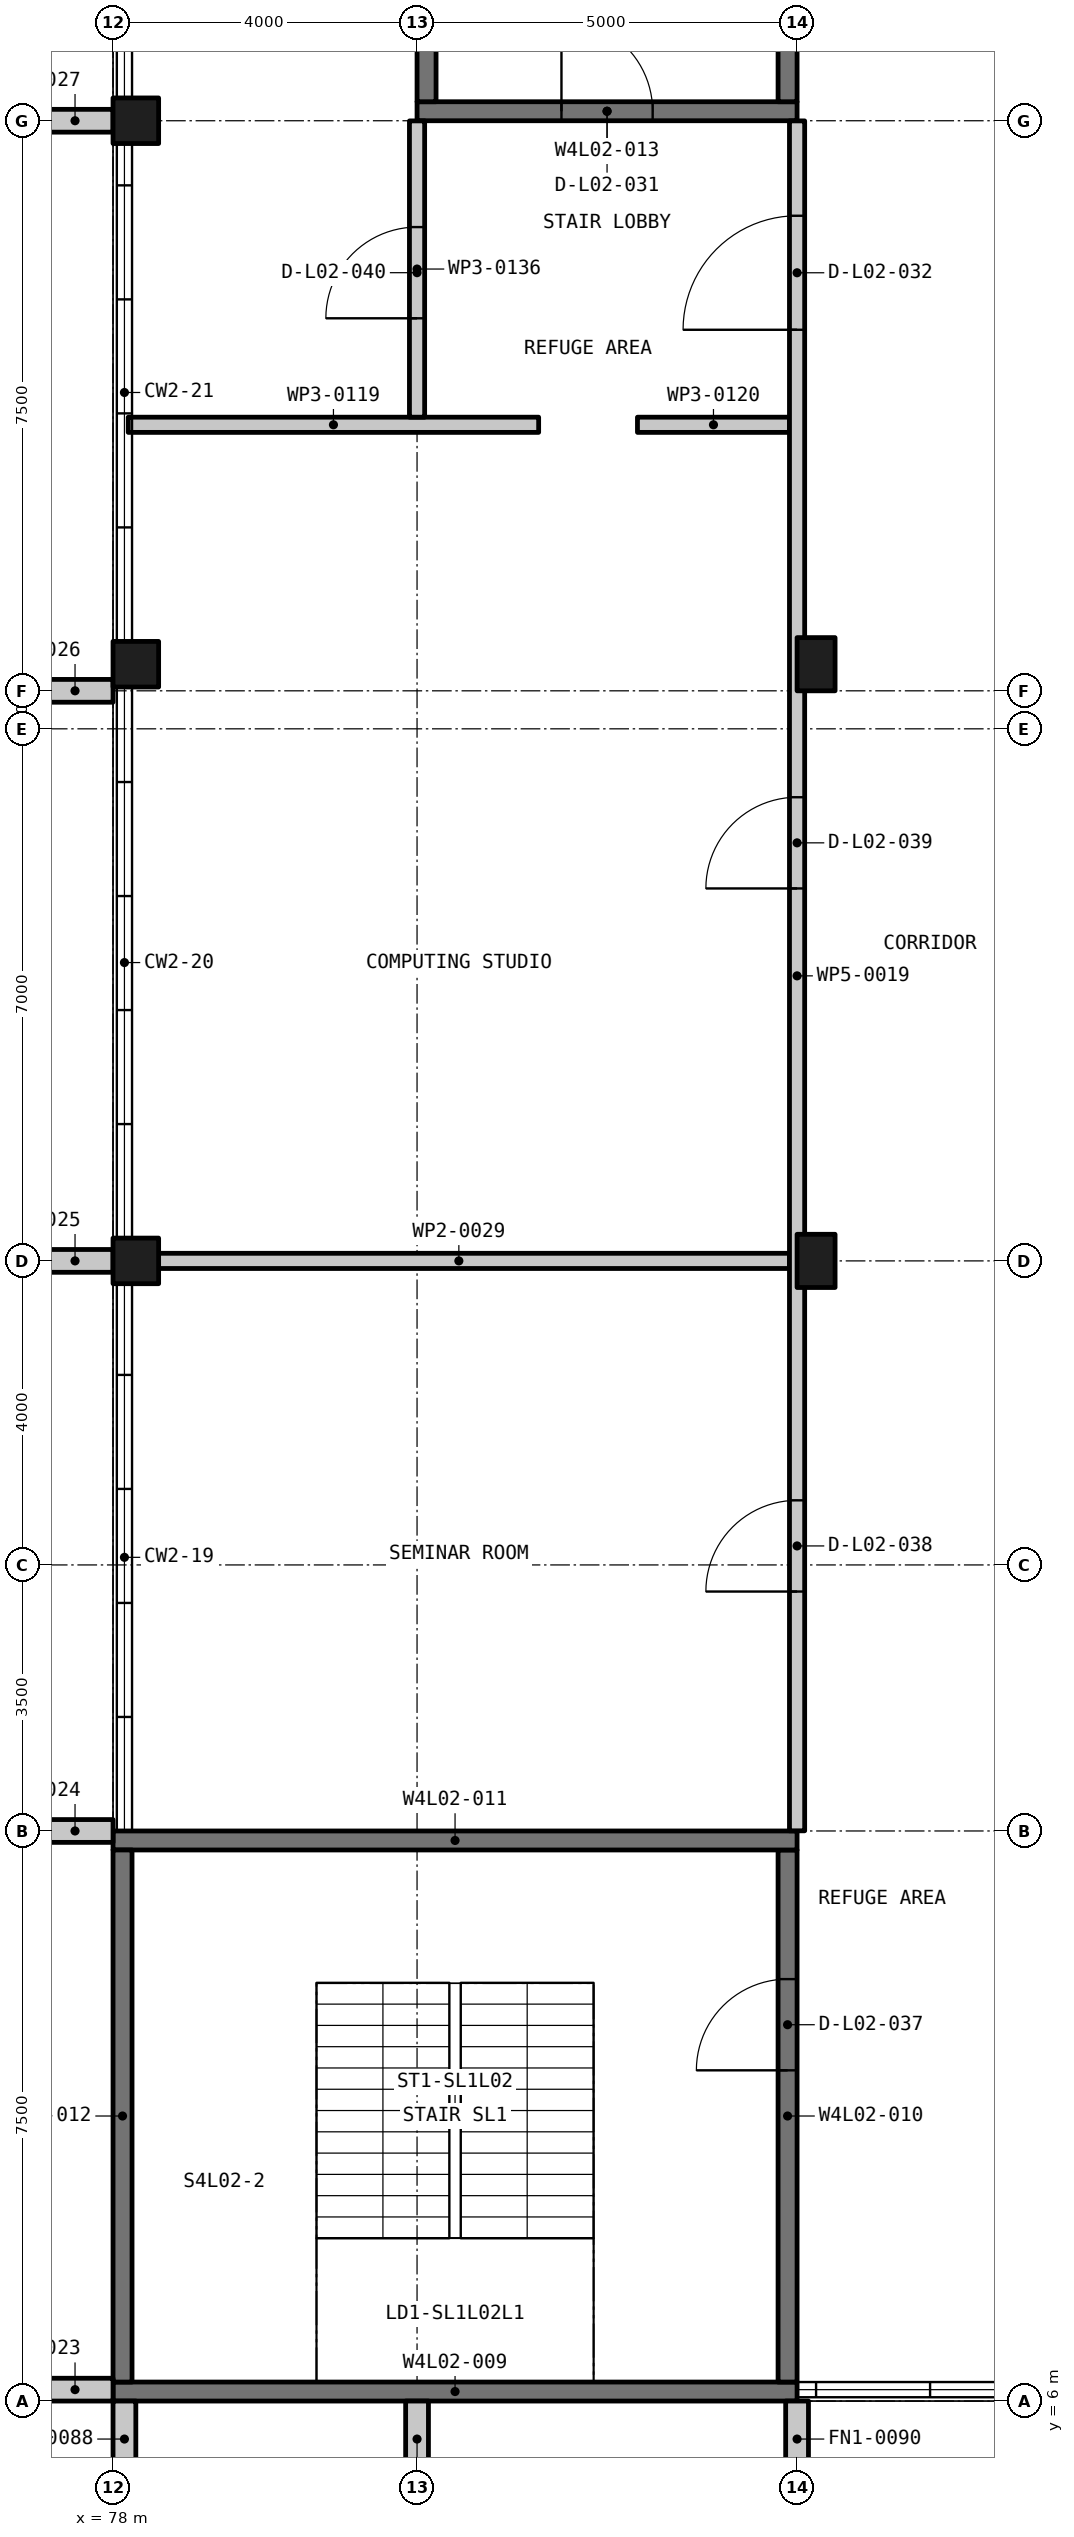
"""IFC4 building model, lengths in metres.
Left out: names, types, materials, properties, quantities, classifications, styles, units other than length and angle.
Written with IfcOpenShell. Run it as: python <this file> out.ifc"""

import sys

from ifc_helpers import new_model, si_unit, direction, frame, frame_2d, origin, origin_2d, place, context, subcontext, project, spatial, rectangle, extrude, element, fill, save


model = new_model("IFC4")
c1 = context("Model", 3, precision=1e-05, world=origin(), true_north=direction((0.0, 1.0)))
c2 = subcontext(c1, "Body", "Model", "MODEL_VIEW")
j1 = project(units=[si_unit("LENGTHUNIT", "METRE"), si_unit("PLANEANGLEUNIT", "RADIAN")], contexts=[c1])
p1 = place(None, origin())
s1 = spatial("IfcSite", under=j1, at=p1, CompositionType="ELEMENT")
p2 = place(p1, origin())
s2 = spatial("IfcBuilding", under=s1, at=p2, CompositionType="ELEMENT")
p3 = place(p2, frame((0.0, 0.0, 11.25)))
s3 = spatial("IfcBuildingStorey", under=s2, at=p3, CompositionType="ELEMENT", Elevation=11.25)
for number, where, z_axis, x_axis in (
    (1, (78.3, 21.0, -0.3), (0.0, 0.0, 1.0), (1.0, 0.0, 0.0)),
    (2, (78.3, 28.85, -0.3), (0.0, 0.0, 1.0), (1.0, 0.0, 0.0)),
    (3, (78.3, 36.0, -0.3), (0.0, 0.0, 1.0), (1.0, 0.0, 0.0)),
):
    element("IfcColumn", number, at=place(p3, frame(where, z_axis=z_axis, x_axis=x_axis)), inside=s3, PredefinedType="COLUMN", context=c2, shape_type="SweptSolid", body=[
        extrude(rectangle(XDim=0.6, YDim=0.6, at=origin_2d()), origin(), (0.0, 0.0, 1.0), 4.5),
    ])
for number, where, z_axis, x_axis in (
    (4, (87.25, 21.0, -0.3), (0.0, 0.0, 1.0), (1.0, 0.0, 0.0)),
    (5, (87.25, 28.85, -0.3), (0.0, 0.0, 1.0), (1.0, 0.0, 0.0)),
):
    element("IfcColumn", number, at=place(p3, frame(where, z_axis=z_axis, x_axis=x_axis)), inside=s3, PredefinedType="COLUMN", context=c2, shape_type="SweptSolid", body=[
        extrude(rectangle(XDim=0.5, YDim=0.7, at=origin_2d()), origin(), (0.0, 0.0, 1.0), 4.5),
    ])
p4 = place(p3, frame((78.0, 6.125, -0.3), z_axis=(0.0, 0.0, 1.0), x_axis=(1.0, 0.0, 0.0)))
e6 = element("IfcWall", 6, at=p4, inside=s3, PredefinedType="SHEAR", context=c2, shape_type="SweptSolid", body=[
    extrude(rectangle(XDim=9.0, YDim=0.25, at=frame_2d((4.5, 0.0))), origin(), (0.0, 0.0, 1.0), 4.5),
])
p5 = place(p3, frame((86.875, 6.25, -0.3), z_axis=(0.0, 0.0, 1.0), x_axis=(0.0, 1.0, 0.0)))
e7 = element("IfcWall", 7, at=p5, inside=s3, PredefinedType="SHEAR", context=c2, shape_type="SweptSolid", body=[
    extrude(rectangle(XDim=7.0, YDim=0.25, at=frame_2d((3.5, 0.0))), origin(), (0.0, 0.0, 1.0), 4.5),
])
p6 = place(p5, frame((4.101, 0.0, 0.3)))
e8 = element("IfcOpeningElement", 8, at=p6, cuts=e7, PredefinedType="OPENING", context=c2, shape_type="SweptSolid", body=[
    extrude(rectangle(XDim=1.2, YDim=2.2, at=frame_2d((0.6, 1.1))), frame((0.0, 0.135, 0.0), z_axis=(0.0, -1.0, 0.0), x_axis=(1.0, 0.0, 0.0)), (0.0, 0.0, 1.0), 0.27),
])
p7 = place(p3, frame((78.0, 13.375, -0.3), z_axis=(0.0, 0.0, 1.0), x_axis=(1.0, 0.0, 0.0)))
e9 = element("IfcWall", 9, at=p7, inside=s3, PredefinedType="SHEAR", context=c2, shape_type="SweptSolid", body=[
    extrude(rectangle(XDim=9.0, YDim=0.25, at=frame_2d((4.5, 0.0))), origin(), (0.0, 0.0, 1.0), 4.5),
])
p8 = place(p3, frame((78.125, 6.25, -0.3), z_axis=(0.0, 0.0, 1.0), x_axis=(0.0, 1.0, 0.0)))
e10 = element("IfcWall", 10, at=p8, inside=s3, PredefinedType="SHEAR", context=c2, shape_type="SweptSolid", body=[
    extrude(rectangle(XDim=7.0, YDim=0.25, at=frame_2d((3.5, 0.0))), origin(), (0.0, 0.0, 1.0), 4.5),
])
p9 = place(p3, frame((82.0, 36.125, -0.3), z_axis=(0.0, 0.0, 1.0), x_axis=(1.0, 0.0, 0.0)))
e11 = element("IfcWall", 11, at=p9, inside=s3, PredefinedType="SHEAR", context=c2, shape_type="SweptSolid", body=[
    extrude(rectangle(XDim=5.0, YDim=0.25, at=frame_2d((2.5, 0.0))), origin(), (0.0, 0.0, 1.0), 4.5),
])
p10 = place(p9, frame((1.9, 0.0, 0.3)))
e12 = element("IfcOpeningElement", 12, at=p10, cuts=e11, PredefinedType="OPENING", context=c2, shape_type="SweptSolid", body=[
    extrude(rectangle(XDim=1.2, YDim=2.2, at=frame_2d((0.6, 1.1))), frame((0.0, 0.135, 0.0), z_axis=(0.0, -1.0, 0.0), x_axis=(1.0, 0.0, 0.0)), (0.0, 0.0, 1.0), 0.27),
])
for number, where, z_axis, x_axis in (
    (13, (86.875, 36.25, -0.3), (0.0, 0.0, 1.0), (0.0, 1.0, 0.0)),
    (14, (82.125, 36.25, -0.3), (0.0, 0.0, 1.0), (0.0, 1.0, 0.0)),
):
    element("IfcWall", number, at=place(p3, frame(where, z_axis=z_axis, x_axis=x_axis)), inside=s3, PredefinedType="SHEAR", context=c2, shape_type="SweptSolid", body=[
        extrude(rectangle(XDim=7.0, YDim=0.25, at=frame_2d((3.5, 0.0))), origin(), (0.0, 0.0, 1.0), 4.5),
    ])
for number, where, z_axis, x_axis in (
    (15, (77.0, 6.15, 0.0), (0.0, 0.0, 1.0), (1.0, 0.0, 0.0)),
    (16, (77.0, 13.5, 0.0), (0.0, 0.0, 1.0), (1.0, 0.0, 0.0)),
    (17, (77.0, 21.0, 0.0), (0.0, 0.0, 1.0), (1.0, 0.0, 0.0)),
    (18, (77.0, 28.5, 0.0), (0.0, 0.0, 1.0), (1.0, 0.0, 0.0)),
    (19, (77.0, 36.0, 0.0), (0.0, 0.0, 1.0), (1.0, 0.0, 0.0)),
    (20, (78.15, 6.0, 0.0), (0.0, 0.0, 1.0), (0.0, -1.0, 0.0)),
    (21, (82.0, 6.0, 0.0), (0.0, 0.0, 1.0), (0.0, -1.0, 0.0)),
    (22, (87.0, 6.0, 0.0), (0.0, 0.0, 1.0), (0.0, -1.0, 0.0)),
):
    element("IfcWall", number, at=place(p3, frame(where, z_axis=z_axis, x_axis=x_axis)), inside=s3, PredefinedType="SOLIDWALL", context=c2, shape_type="SweptSolid", body=[
        extrude(rectangle(XDim=1.0, YDim=0.3, at=frame_2d((0.5, 0.0))), origin(), (0.0, 0.0, 1.0), 4.5),
    ])
p11 = place(p3, frame((78.2, 21.0, 0.0), z_axis=(0.0, 0.0, 1.0), x_axis=(1.0, 0.0, 0.0)))
e23 = element("IfcWall", 23, at=p11, inside=s3, PredefinedType="PARTITIONING", context=c2, shape_type="SweptSolid", body=[
    extrude(rectangle(XDim=8.7, YDim=0.2, at=frame_2d((4.35, 0.0))), origin(), (0.0, 0.0, 1.0), 3.4),
])
p12 = place(p3, frame((78.2, 32.0, 0.0), z_axis=(0.0, 0.0, 1.0), x_axis=(1.0, 0.0, 0.0)))
e24 = element("IfcWall", 24, at=p12, inside=s3, PredefinedType="PARTITIONING", context=c2, shape_type="SweptSolid", body=[
    extrude(rectangle(XDim=5.4, YDim=0.2, at=frame_2d((2.7, 0.0))), origin(), (0.0, 0.0, 1.0), 3.4),
])
p13 = place(p3, frame((84.9, 32.0, 0.0), z_axis=(0.0, 0.0, 1.0), x_axis=(1.0, 0.0, 0.0)))
e25 = element("IfcWall", 25, at=p13, inside=s3, PredefinedType="PARTITIONING", context=c2, shape_type="SweptSolid", body=[
    extrude(rectangle(XDim=2.0, YDim=0.2, at=frame_2d((1.0, 0.0))), origin(), (0.0, 0.0, 1.0), 4.2),
])
p14 = place(p3, frame((87.0, 13.502, 0.0), z_axis=(0.0, 0.0, 1.0), x_axis=(0.0, 1.0, 0.0)))
e26 = element("IfcWall", 26, at=p14, inside=s3, PredefinedType="PARTITIONING", context=c2, shape_type="SweptSolid", body=[
    extrude(rectangle(XDim=22.496, YDim=0.2, at=frame_2d((11.248, 0.0))), origin(), (0.0, 0.0, 1.0), 3.3),
])
p15 = place(p14, frame((19.748, 0.0, 0.0)))
e27 = element("IfcOpeningElement", 27, at=p15, cuts=e26, PredefinedType="OPENING", context=c2, shape_type="SweptSolid", body=[
    extrude(rectangle(XDim=1.5, YDim=2.1, at=frame_2d((0.75, 1.05))), frame((0.0, 0.11, 0.0), z_axis=(0.0, -1.0, 0.0), x_axis=(1.0, 0.0, 0.0)), (0.0, 0.0, 1.0), 0.22),
])
p16 = place(p14, frame((3.148, 0.0, 0.0)))
e28 = element("IfcOpeningElement", 28, at=p16, cuts=e26, PredefinedType="OPENING", context=c2, shape_type="SweptSolid", body=[
    extrude(rectangle(XDim=1.2, YDim=2.1, at=frame_2d((0.6, 1.05))), frame((0.0, 0.11, 0.0), z_axis=(0.0, -1.0, 0.0), x_axis=(1.0, 0.0, 0.0)), (0.0, 0.0, 1.0), 0.22),
])
p17 = place(p14, frame((12.398, 0.0, 0.0)))
e29 = element("IfcOpeningElement", 29, at=p17, cuts=e26, PredefinedType="OPENING", context=c2, shape_type="SweptSolid", body=[
    extrude(rectangle(XDim=1.2, YDim=2.1, at=frame_2d((0.6, 1.05))), frame((0.0, 0.11, 0.0), z_axis=(0.0, -1.0, 0.0), x_axis=(1.0, 0.0, 0.0)), (0.0, 0.0, 1.0), 0.22),
])
p18 = place(p3, frame((82.0, 32.1, 0.0), z_axis=(0.0, 0.0, 1.0), x_axis=(0.0, 1.0, 0.0)))
e30 = element("IfcWall", 30, at=p18, inside=s3, PredefinedType="PARTITIONING", context=c2, shape_type="SweptSolid", body=[
    extrude(rectangle(XDim=3.898, YDim=0.2, at=frame_2d((1.949, 0.0))), origin(), (0.0, 0.0, 1.0), 3.4),
])
p19 = place(p18, frame((1.301, 0.0, 0.0)))
e31 = element("IfcOpeningElement", 31, at=p19, cuts=e30, PredefinedType="OPENING", context=c2, shape_type="SweptSolid", body=[
    extrude(rectangle(XDim=1.2, YDim=2.1, at=frame_2d((0.6, 1.05))), frame((0.0, 0.11, 0.0), z_axis=(0.0, -1.0, 0.0), x_axis=(1.0, 0.0, 0.0)), (0.0, 0.0, 1.0), 0.22),
])
p20 = place(p10, origin())
e32 = element("IfcDoor", 32, at=p20, inside=s3, OperationType="SINGLE_SWING_LEFT", PredefinedType="DOOR", context=c2, shape_type="SweptSolid", body=[
    extrude(rectangle(XDim=1.2, YDim=2.2, at=frame_2d((0.6, 1.1))), frame((0.0, 0.025, 0.0), z_axis=(0.0, -1.0, 0.0), x_axis=(1.0, 0.0, 0.0)), (0.0, 0.0, 1.0), 0.05),
])
fill(e12, e32)
p21 = place(p15, origin())
e33 = element("IfcDoor", 33, at=p21, inside=s3, OperationType="DOUBLE_DOOR_SINGLE_SWING", PredefinedType="DOOR", context=c2, shape_type="SweptSolid", body=[
    extrude(rectangle(XDim=1.5, YDim=2.1, at=frame_2d((0.75, 1.05))), frame((0.0, 0.025, 0.0), z_axis=(0.0, -1.0, 0.0), x_axis=(1.0, 0.0, 0.0)), (0.0, 0.0, 1.0), 0.05),
])
fill(e27, e33)
p22 = place(p6, origin())
e34 = element("IfcDoor", 34, at=p22, inside=s3, OperationType="SINGLE_SWING_LEFT", PredefinedType="DOOR", context=c2, shape_type="SweptSolid", body=[
    extrude(rectangle(XDim=1.2, YDim=2.2, at=frame_2d((0.6, 1.1))), frame((0.0, 0.025, 0.0), z_axis=(0.0, -1.0, 0.0), x_axis=(1.0, 0.0, 0.0)), (0.0, 0.0, 1.0), 0.05),
])
fill(e8, e34)
p23 = place(p16, origin())
e35 = element("IfcDoor", 35, at=p23, inside=s3, OperationType="SINGLE_SWING_RIGHT", PredefinedType="DOOR", context=c2, shape_type="SweptSolid", body=[
    extrude(rectangle(XDim=1.2, YDim=2.1, at=frame_2d((0.6, 1.05))), frame((0.0, 0.025, 0.0), z_axis=(0.0, -1.0, 0.0), x_axis=(1.0, 0.0, 0.0)), (0.0, 0.0, 1.0), 0.05),
])
fill(e28, e35)
p24 = place(p17, origin())
e36 = element("IfcDoor", 36, at=p24, inside=s3, OperationType="SINGLE_SWING_LEFT", PredefinedType="DOOR", context=c2, shape_type="SweptSolid", body=[
    extrude(rectangle(XDim=1.2, YDim=2.1, at=frame_2d((0.6, 1.05))), frame((0.0, 0.025, 0.0), z_axis=(0.0, -1.0, 0.0), x_axis=(1.0, 0.0, 0.0)), (0.0, 0.0, 1.0), 0.05),
])
fill(e29, e36)
p25 = place(p19, origin())
e37 = element("IfcDoor", 37, at=p25, inside=s3, OperationType="SINGLE_SWING_RIGHT", PredefinedType="DOOR", context=c2, shape_type="SweptSolid", body=[
    extrude(rectangle(XDim=1.2, YDim=2.1, at=frame_2d((0.6, 1.05))), frame((0.0, 0.025, 0.0), z_axis=(0.0, -1.0, 0.0), x_axis=(1.0, 0.0, 0.0)), (0.0, 0.0, 1.0), 0.05),
])
fill(e31, e37)
save(model, sys.argv[1])
